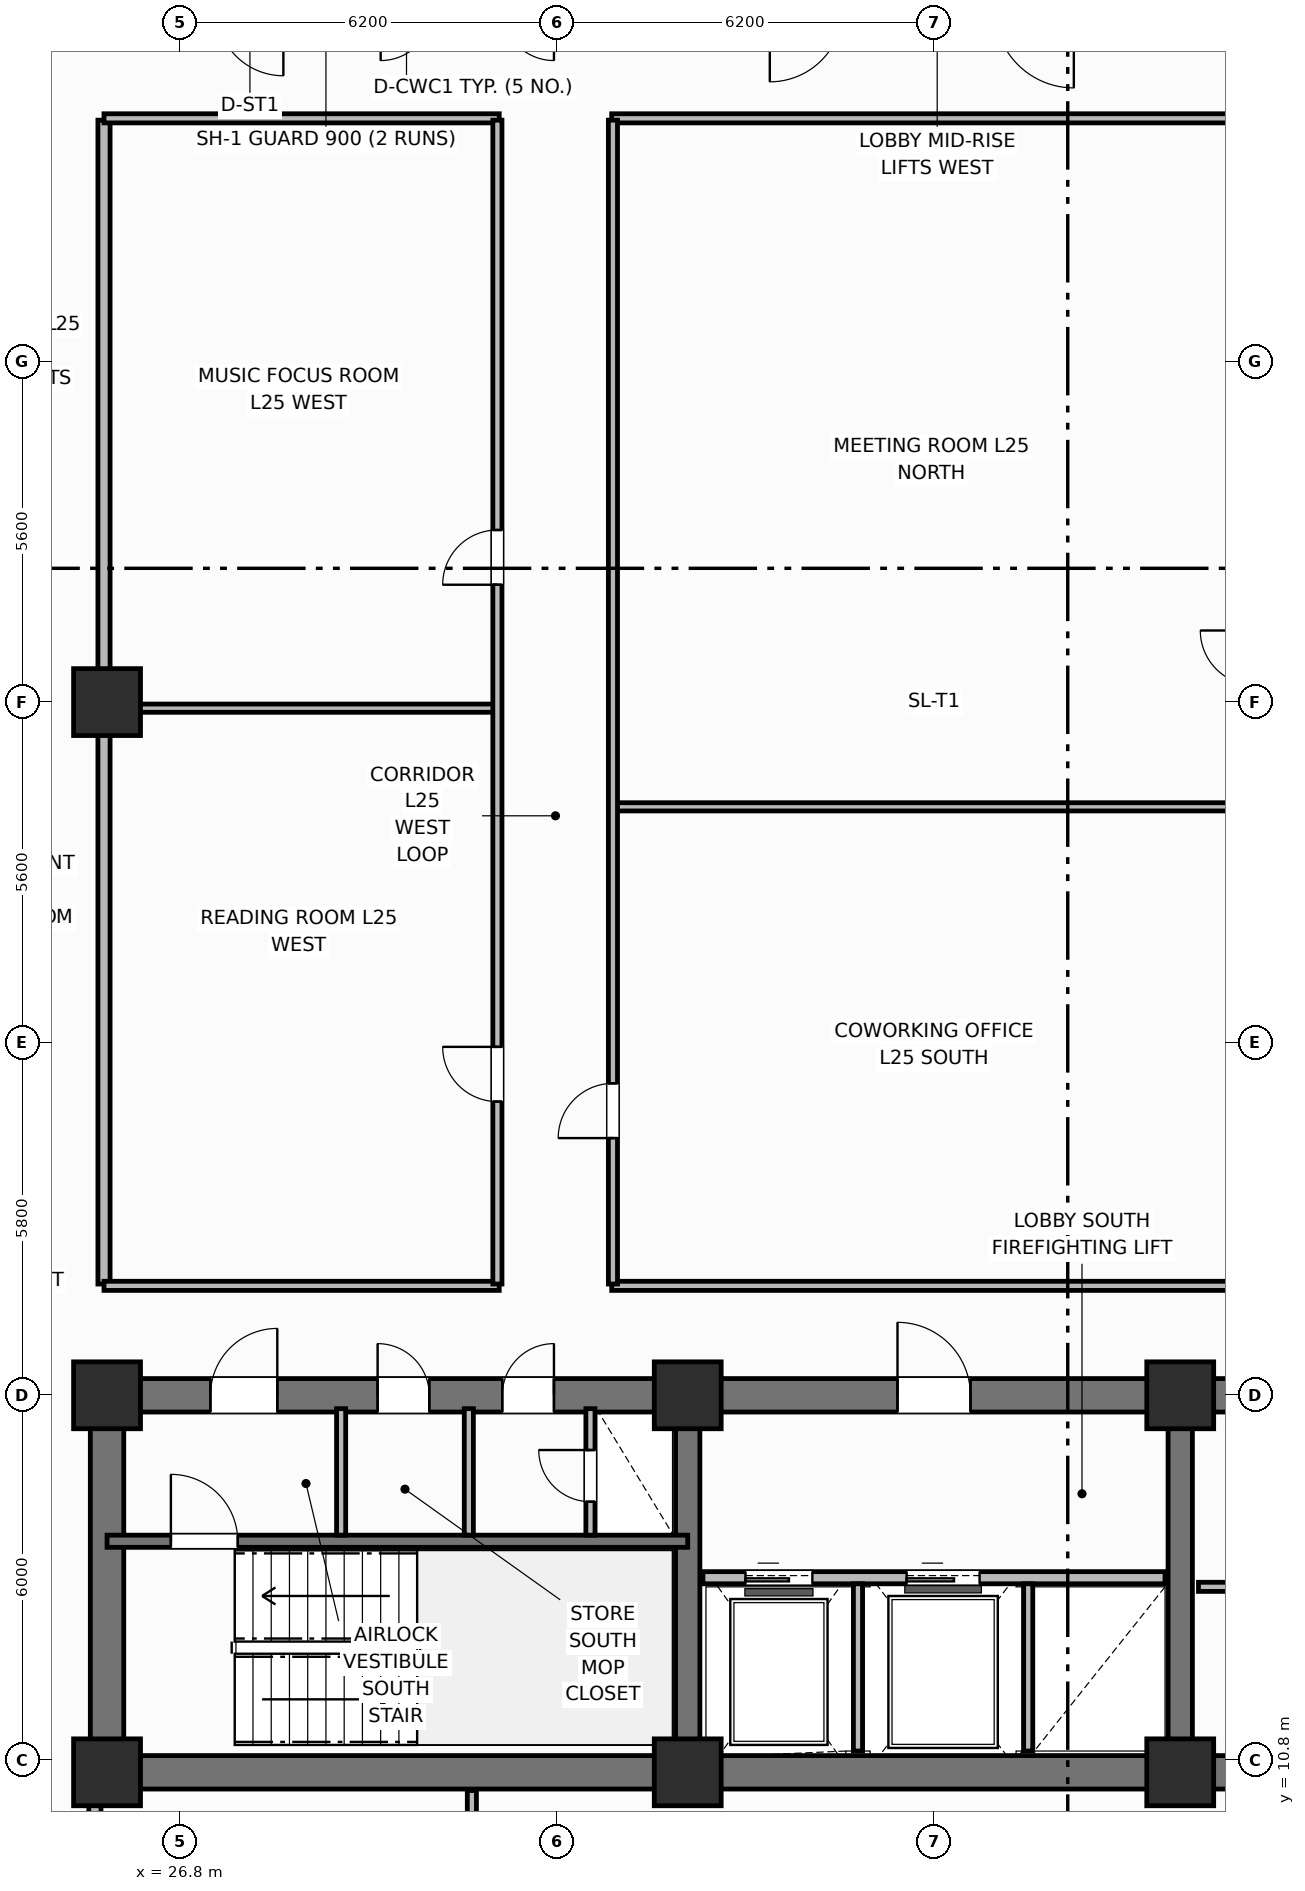
"""IFC4 building model, lengths in metres.
Left out: names, types, materials, properties, quantities, classifications, styles, units other than length and angle.
Written with IfcOpenShell. Run it as: python <this file> out.ifc"""

import sys

from ifc_helpers import new_model, si_unit, direction, frame, frame_2d, origin, origin_2d, place, context, subcontext, project, spatial, rectangle, extrude, element, fill, save


model = new_model("IFC4")
c1 = context("Model", 3, precision=1e-05, world=origin(), true_north=direction((0.0, 1.0)))
c2 = subcontext(c1, "Body", "Model", "MODEL_VIEW")
j1 = project(units=[si_unit("LENGTHUNIT", "METRE"), si_unit("PLANEANGLEUNIT", "RADIAN")], contexts=[c1])
p1 = place(None, origin())
s1 = spatial("IfcSite", under=j1, at=p1, CompositionType="ELEMENT")
p2 = place(p1, origin())
s2 = spatial("IfcBuilding", under=s1, at=p2, CompositionType="ELEMENT")
p3 = place(p2, frame((0.0, 0.0, 103.1)))
s3 = spatial("IfcBuildingStorey", under=s2, at=p3, CompositionType="ELEMENT", Elevation=103.1)
p4 = place(p3, frame((52.8, 10.6, 0.0), z_axis=(0.0, 0.0, 1.0), x_axis=(-1.0, 0.0, 0.0)))
e1 = element("IfcWall", 1, at=p4, inside=s3, PredefinedType="SHEAR", context=c2, shape_type="SweptSolid", body=[
    extrude(rectangle(XDim=27.2, YDim=0.55, at=frame_2d((13.6, 0.0))), origin(), (0.0, 0.0, 1.0), 3.7),
])
p5 = place(p3, frame((25.6, 10.875, 0.0), z_axis=(0.0, 0.0, 1.0), x_axis=(0.0, 1.0, 0.0)))
e2 = element("IfcWall", 2, at=p5, inside=s3, PredefinedType="SHEAR", context=c2, shape_type="SweptSolid", body=[
    extrude(rectangle(XDim=5.65, YDim=0.55, at=frame_2d((2.825, 0.0))), origin(), (0.0, 0.0, 1.0), 3.7),
])
p6 = place(p3, frame((25.6, 16.8, 0.0), z_axis=(0.0, 0.0, 1.0), x_axis=(1.0, 0.0, 0.0)))
e3 = element("IfcWall", 3, at=p6, inside=s3, PredefinedType="SHEAR", context=c2, shape_type="SweptSolid", body=[
    extrude(rectangle(XDim=27.2, YDim=0.55, at=frame_2d((13.6, 0.0))), origin(), (0.0, 0.0, 1.0), 3.7),
])
p7 = place(p6, frame((1.7, 0.0, 0.0)))
e4 = element("IfcOpeningElement", 4, at=p7, cuts=e3, PredefinedType="OPENING", context=c2, shape_type="SweptSolid", body=[
    extrude(rectangle(XDim=1.1, YDim=2.15, at=frame_2d((0.55, 1.075))), frame((0.0, 0.285, 0.0), z_axis=(0.0, -1.0, 0.0), x_axis=(1.0, 0.0, 0.0)), (0.0, 0.0, 1.0), 0.57),
])
p8 = place(p6, frame((4.45, 0.0, 0.0)))
e5 = element("IfcOpeningElement", 5, at=p8, cuts=e3, PredefinedType="OPENING", context=c2, shape_type="SweptSolid", body=[
    extrude(rectangle(XDim=0.85, YDim=2.1, at=frame_2d((0.425, 1.05))), frame((0.0, 0.285, 0.0), z_axis=(0.0, -1.0, 0.0), x_axis=(1.0, 0.0, 0.0)), (0.0, 0.0, 1.0), 0.57),
])
p9 = place(p6, frame((6.5, 0.0, 0.0)))
e6 = element("IfcOpeningElement", 6, at=p9, cuts=e3, PredefinedType="OPENING", context=c2, shape_type="SweptSolid", body=[
    extrude(rectangle(XDim=0.85, YDim=2.1, at=frame_2d((0.425, 1.05))), frame((0.0, 0.285, 0.0), z_axis=(0.0, -1.0, 0.0), x_axis=(1.0, 0.0, 0.0)), (0.0, 0.0, 1.0), 0.57),
])
p10 = place(p6, frame((13.0, 0.0, 0.0)))
e7 = element("IfcOpeningElement", 7, at=p10, cuts=e3, PredefinedType="OPENING", context=c2, shape_type="SweptSolid", body=[
    extrude(rectangle(XDim=1.2, YDim=2.15, at=frame_2d((0.6, 1.075))), frame((0.0, 0.285, 0.0), z_axis=(0.0, -1.0, 0.0), x_axis=(1.0, 0.0, 0.0)), (0.0, 0.0, 1.0), 0.57),
])
p11 = place(p6, frame((19.8, 0.0, 0.0)))
e8 = element("IfcOpeningElement", 8, at=p11, cuts=e3, PredefinedType="OPENING", context=c2, shape_type="SweptSolid", body=[
    extrude(rectangle(XDim=0.85, YDim=2.1, at=frame_2d((0.425, 1.05))), frame((0.0, 0.285, 0.0), z_axis=(0.0, -1.0, 0.0), x_axis=(1.0, 0.0, 0.0)), (0.0, 0.0, 1.0), 0.57),
])
p12 = place(p6, frame((24.2, 0.0, 0.0)))
e9 = element("IfcOpeningElement", 9, at=p12, cuts=e3, PredefinedType="OPENING", context=c2, shape_type="SweptSolid", body=[
    extrude(rectangle(XDim=0.85, YDim=2.1, at=frame_2d((0.425, 1.05))), frame((0.0, 0.285, 0.0), z_axis=(0.0, -1.0, 0.0), x_axis=(1.0, 0.0, 0.0)), (0.0, 0.0, 1.0), 0.57),
])
for number, where, z_axis, x_axis in (
    (10, (35.15, 10.875, 0.0), (0.0, 0.0, 1.0), (0.0, 1.0, 0.0)),
    (11, (43.25, 10.875, 0.0), (0.0, 0.0, 1.0), (0.0, 1.0, 0.0)),
):
    element("IfcWall", number, at=place(p3, frame(where, z_axis=z_axis, x_axis=x_axis)), inside=s3, PredefinedType="SHEAR", context=c2, shape_type="SweptSolid", body=[
        extrude(rectangle(XDim=5.65, YDim=0.4, at=frame_2d((2.825, 0.0))), origin(), (0.0, 0.0, 1.0), 3.7),
    ])
for number, where, z_axis, x_axis in (
    (12, (25.6, 10.6, 0.0), (0.0, 0.0, 1.0), (1.0, 0.0, 0.0)),
    (13, (25.6, 16.8, 0.0), (0.0, 0.0, 1.0), (1.0, 0.0, 0.0)),
    (14, (35.15, 10.6, 0.0), (0.0, 0.0, 1.0), (1.0, 0.0, 0.0)),
    (15, (35.15, 16.8, 0.0), (0.0, 0.0, 1.0), (1.0, 0.0, 0.0)),
    (16, (43.25, 10.6, 0.0), (0.0, 0.0, 1.0), (1.0, 0.0, 0.0)),
    (17, (43.25, 16.8, 0.0), (0.0, 0.0, 1.0), (1.0, 0.0, 0.0)),
    (18, (25.6, 28.2, 0.0), (0.0, 0.0, 1.0), (1.0, 0.0, 0.0)),
):
    element("IfcColumn", number, at=place(p3, frame(where, z_axis=z_axis, x_axis=x_axis)), inside=s3, PredefinedType="COLUMN", context=c2, shape_type="SweptSolid", body=[
        extrude(rectangle(XDim=1.1, YDim=1.1, at=origin_2d()), origin(), (0.0, 0.0, 1.0), 3.7),
    ])
p13 = place(p3, frame((25.6, 14.4, 0.0), z_axis=(0.0, 0.0, 1.0), x_axis=(1.0, 0.0, 0.0)))
e19 = element("IfcWall", 19, at=p13, inside=s3, PredefinedType="SHEAR", context=c2, shape_type="SweptSolid", body=[
    extrude(rectangle(XDim=9.55, YDim=0.2, at=frame_2d((4.775, 0.0))), origin(), (0.0, 0.0, 1.0), 3.7),
])
p14 = place(p13, frame((1.05, 0.0, 0.0)))
e20 = element("IfcOpeningElement", 20, at=p14, cuts=e19, PredefinedType="OPENING", context=c2, shape_type="SweptSolid", body=[
    extrude(rectangle(XDim=1.1, YDim=2.15, at=frame_2d((0.55, 1.075))), frame((0.0, 0.11, 0.0), z_axis=(0.0, -1.0, 0.0), x_axis=(1.0, 0.0, 0.0)), (0.0, 0.0, 1.0), 0.22),
])
for number, where, z_axis, x_axis in (
    (21, (29.45, 14.5, 0.0), (0.0, 0.0, 1.0), (0.0, 1.0, 0.0)),
    (22, (31.55, 14.5, 0.0), (0.0, 0.0, 1.0), (0.0, 1.0, 0.0)),
):
    element("IfcWall", number, at=place(p3, frame(where, z_axis=z_axis, x_axis=x_axis)), inside=s3, PredefinedType="PARTITIONING", context=c2, shape_type="SweptSolid", body=[
        extrude(rectangle(XDim=2.08, YDim=0.15, at=frame_2d((1.04, 0.0))), origin(), (0.0, 0.0, 1.0), 2.53),
    ])
p15 = place(p3, frame((33.55, 14.5, 0.0), z_axis=(0.0, 0.0, 1.0), x_axis=(0.0, 1.0, 0.0)))
e23 = element("IfcWall", 23, at=p15, inside=s3, PredefinedType="PARTITIONING", context=c2, shape_type="SweptSolid", body=[
    extrude(rectangle(XDim=2.08, YDim=0.15, at=frame_2d((1.04, 0.0))), origin(), (0.0, 0.0, 1.0), 2.53),
])
p16 = place(p15, frame((0.55, 0.0, 0.0)))
e24 = element("IfcOpeningElement", 24, at=p16, cuts=e23, PredefinedType="OPENING", context=c2, shape_type="SweptSolid", body=[
    extrude(rectangle(XDim=0.85, YDim=2.05, at=frame_2d((0.425, 1.025))), frame((0.0, 0.085, 0.0), z_axis=(0.0, -1.0, 0.0), x_axis=(1.0, 0.0, 0.0)), (0.0, 0.0, 1.0), 0.17),
])
p17 = place(p3, frame((35.4, 13.8, 0.0), z_axis=(0.0, 0.0, 1.0), x_axis=(1.0, 0.0, 0.0)))
e25 = element("IfcWall", 25, at=p17, inside=s3, PredefinedType="PARTITIONING", context=c2, shape_type="SweptSolid", body=[
    extrude(rectangle(XDim=7.6, YDim=0.2, at=frame_2d((3.8, 0.0))), origin(), (0.0, 0.0, 1.0), 2.3),
])
p18 = place(p17, frame((0.7, 0.0, 0.0)))
e26 = element("IfcOpeningElement", 26, at=p18, cuts=e25, PredefinedType="OPENING", context=c2, shape_type="SweptSolid", body=[
    extrude(rectangle(XDim=1.1, YDim=2.15, at=frame_2d((0.55, 1.075))), frame((0.0, 0.11, 0.0), z_axis=(0.0, -1.0, 0.0), x_axis=(1.0, 0.0, 0.0)), (0.0, 0.0, 1.0), 0.22),
])
p19 = place(p17, frame((3.35, 0.0, 0.0)))
e27 = element("IfcOpeningElement", 27, at=p19, cuts=e25, PredefinedType="OPENING", context=c2, shape_type="SweptSolid", body=[
    extrude(rectangle(XDim=1.2, YDim=2.15, at=frame_2d((0.6, 1.075))), frame((0.0, 0.11, 0.0), z_axis=(0.0, -1.0, 0.0), x_axis=(1.0, 0.0, 0.0)), (0.0, 0.0, 1.0), 0.22),
])
for number, where, z_axis, x_axis in (
    (28, (37.95, 10.95, 0.0), (0.0, 0.0, 1.0), (0.0, 1.0, 0.0)),
    (29, (40.75, 10.95, 0.0), (0.0, 0.0, 1.0), (0.0, 1.0, 0.0)),
):
    element("IfcWall", number, at=place(p3, frame(where, z_axis=z_axis, x_axis=x_axis)), inside=s3, PredefinedType="PARTITIONING", context=c2, shape_type="SweptSolid", body=[
        extrude(rectangle(XDim=2.75, YDim=0.15, at=frame_2d((1.375, 0.0))), origin(), (0.0, 0.0, 1.0), 2.53),
    ])
p20 = place(p3, frame((43.55, 13.65, 0.0), z_axis=(0.0, 0.0, 1.0), x_axis=(1.0, 0.0, 0.0)))
e30 = element("IfcWall", 30, at=p20, inside=s3, PredefinedType="PARTITIONING", context=c2, shape_type="SweptSolid", body=[
    extrude(rectangle(XDim=4.4, YDim=0.15, at=frame_2d((2.2, 0.0))), origin(), (0.0, 0.0, 1.0), 2.53),
])
p21 = place(p20, frame((1.6, 0.0, 0.0)))
e31 = element("IfcOpeningElement", 31, at=p21, cuts=e30, PredefinedType="OPENING", context=c2, shape_type="SweptSolid", body=[
    extrude(rectangle(XDim=0.85, YDim=2.1, at=frame_2d((0.425, 1.05))), frame((0.0, 0.085, 0.0), z_axis=(0.0, -1.0, 0.0), x_axis=(1.0, 0.0, 0.0)), (0.0, 0.0, 1.0), 0.17),
])
p22 = place(p3, frame((25.55, 18.63, 0.0), z_axis=(0.0, 0.0, 1.0), x_axis=(0.0, 1.0, 0.0)))
e32 = element("IfcWall", 32, at=p22, inside=s3, PredefinedType="PARTITIONING", context=c2, shape_type="SweptSolid", body=[
    extrude(rectangle(XDim=19.14, YDim=0.2, at=frame_2d((9.57, 0.0))), origin(), (0.0, 0.0, 1.0), 2.53),
])
for number, where, z_axis, x_axis in (
    (33, (25.55, 18.6, 0.0), (0.0, 0.0, 1.0), (1.0, 0.0, 0.0)),
    (34, (25.55, 37.8, 0.0), (0.0, 0.0, 1.0), (1.0, 0.0, 0.0)),
):
    element("IfcWall", number, at=place(p3, frame(where, z_axis=z_axis, x_axis=x_axis)), inside=s3, PredefinedType="PARTITIONING", context=c2, shape_type="SweptSolid", body=[
        extrude(rectangle(XDim=6.5, YDim=0.15, at=frame_2d((3.25, 0.0))), origin(), (0.0, 0.0, 1.0), 2.53),
    ])
for number, where, z_axis, x_axis in (
    (35, (33.9, 18.6, 0.0), (0.0, 0.0, 1.0), (1.0, 0.0, 0.0)),
    (36, (33.9, 37.8, 0.0), (0.0, 0.0, 1.0), (1.0, 0.0, 0.0)),
):
    element("IfcWall", number, at=place(p3, frame(where, z_axis=z_axis, x_axis=x_axis)), inside=s3, PredefinedType="PARTITIONING", context=c2, shape_type="SweptSolid", body=[
        extrude(rectangle(XDim=10.6, YDim=0.15, at=frame_2d((5.3, 0.0))), origin(), (0.0, 0.0, 1.0), 2.53),
    ])
p23 = place(p3, frame((25.6, 28.1, 0.0), z_axis=(0.0, 0.0, 1.0), x_axis=(1.0, 0.0, 0.0)))
e37 = element("IfcWall", 37, at=p23, inside=s3, PredefinedType="PARTITIONING", context=c2, shape_type="SweptSolid", body=[
    extrude(rectangle(XDim=6.42, YDim=0.135, at=frame_2d((3.21, 0.0))), origin(), (0.0, 0.0, 1.0), 2.53),
])
p24 = place(p3, frame((33.92, 26.477, 0.0), z_axis=(0.0, 0.0, 1.0), x_axis=(1.0, 0.0, 0.0)))
e38 = element("IfcWall", 38, at=p24, inside=s3, PredefinedType="PARTITIONING", context=c2, shape_type="SweptSolid", body=[
    extrude(rectangle(XDim=10.56, YDim=0.135, at=frame_2d((5.28, 0.0))), origin(), (0.0, 0.0, 1.0), 2.53),
])
p25 = place(p3, frame((32.02, 18.63, 0.0), z_axis=(0.0, 0.0, 1.0), x_axis=(0.0, 1.0, 0.0)))
e39 = element("IfcWall", 39, at=p25, inside=s3, PredefinedType="PARTITIONING", context=c2, shape_type="SweptSolid", body=[
    extrude(rectangle(XDim=19.14, YDim=0.15, at=frame_2d((9.57, 0.0))), origin(), (0.0, 0.0, 1.0), 2.53),
])
p26 = place(p25, frame((3.0, 0.0, 0.0)))
e40 = element("IfcOpeningElement", 40, at=p26, cuts=e39, PredefinedType="OPENING", context=c2, shape_type="SweptSolid", body=[
    extrude(rectangle(XDim=0.9, YDim=2.1, at=frame_2d((0.45, 1.05))), frame((0.0, 0.085, 0.0), z_axis=(0.0, -1.0, 0.0), x_axis=(1.0, 0.0, 0.0)), (0.0, 0.0, 1.0), 0.17),
])
p27 = place(p25, frame((11.5, 0.0, 0.0)))
e41 = element("IfcOpeningElement", 41, at=p27, cuts=e39, PredefinedType="OPENING", context=c2, shape_type="SweptSolid", body=[
    extrude(rectangle(XDim=0.9, YDim=2.1, at=frame_2d((0.45, 1.05))), frame((0.0, 0.085, 0.0), z_axis=(0.0, -1.0, 0.0), x_axis=(1.0, 0.0, 0.0)), (0.0, 0.0, 1.0), 0.17),
])
p28 = place(p3, frame((33.92, 18.63, 0.0), z_axis=(0.0, 0.0, 1.0), x_axis=(0.0, 1.0, 0.0)))
e42 = element("IfcWall", 42, at=p28, inside=s3, PredefinedType="PARTITIONING", context=c2, shape_type="SweptSolid", body=[
    extrude(rectangle(XDim=19.14, YDim=0.15, at=frame_2d((9.57, 0.0))), origin(), (0.0, 0.0, 1.0), 2.53),
])
p29 = place(p28, frame((2.4, 0.0, 0.0)))
e43 = element("IfcOpeningElement", 43, at=p29, cuts=e42, PredefinedType="OPENING", context=c2, shape_type="SweptSolid", body=[
    extrude(rectangle(XDim=0.9, YDim=2.1, at=frame_2d((0.45, 1.05))), frame((0.0, 0.085, 0.0), z_axis=(0.0, -1.0, 0.0), x_axis=(1.0, 0.0, 0.0)), (0.0, 0.0, 1.0), 0.17),
])
p30 = place(p3, frame((31.6, 4.97, 0.0), z_axis=(0.0, 0.0, 1.0), x_axis=(0.0, 1.0, 0.0)))
e44 = element("IfcWall", 44, at=p30, inside=s3, PredefinedType="PARTITIONING", context=c2, shape_type="SweptSolid", body=[
    extrude(rectangle(XDim=5.33, YDim=0.15, at=frame_2d((2.665, 0.0))), origin(), (0.0, 0.0, 1.0), 2.53),
])
p31 = place(p30, frame((1.65, 0.0, 0.0)))
e45 = element("IfcOpeningElement", 45, at=p31, cuts=e44, PredefinedType="OPENING", context=c2, shape_type="SweptSolid", body=[
    extrude(rectangle(XDim=0.9, YDim=2.1, at=frame_2d((0.45, 1.05))), frame((0.0, 0.085, 0.0), z_axis=(0.0, -1.0, 0.0), x_axis=(1.0, 0.0, 0.0)), (0.0, 0.0, 1.0), 0.17),
])
p32 = place(p3, frame((25.4, 5.97, 0.0), z_axis=(0.0, 0.0, 1.0), x_axis=(0.0, 1.0, 0.0)))
e46 = element("IfcWall", 46, at=p32, inside=s3, PredefinedType="PARTITIONING", context=c2, shape_type="SweptSolid", body=[
    extrude(rectangle(XDim=4.33, YDim=0.2, at=frame_2d((2.165, 0.0))), origin(), (0.0, 0.0, 1.0), 2.53),
])
p33 = place(p32, frame((0.85, 0.0, 0.0)))
e47 = element("IfcOpeningElement", 47, at=p33, cuts=e46, PredefinedType="OPENING", context=c2, shape_type="SweptSolid", body=[
    extrude(rectangle(XDim=0.9, YDim=2.1, at=frame_2d((0.45, 1.05))), frame((0.0, 0.11, 0.0), z_axis=(0.0, -1.0, 0.0), x_axis=(1.0, 0.0, 0.0)), (0.0, 0.0, 1.0), 0.22),
])
p34 = place(p14, origin())
e48 = element("IfcDoor", 48, at=p34, inside=s3, OperationType="SINGLE_SWING_LEFT", PredefinedType="DOOR", context=c2, shape_type="SweptSolid", body=[
    extrude(rectangle(XDim=1.1, YDim=2.15, at=frame_2d((0.55, 1.075))), frame((0.0, 0.025, 0.0), z_axis=(0.0, -1.0, 0.0), x_axis=(1.0, 0.0, 0.0)), (0.0, 0.0, 1.0), 0.05),
])
fill(e20, e48)
p35 = place(p16, origin())
e49 = element("IfcDoor", 49, at=p35, inside=s3, OperationType="SINGLE_SWING_RIGHT", PredefinedType="TRAPDOOR", context=c2, shape_type="SweptSolid", body=[
    extrude(rectangle(XDim=0.85, YDim=2.05, at=frame_2d((0.425, 1.025))), frame((0.0, 0.025, 0.0), z_axis=(0.0, -1.0, 0.0), x_axis=(1.0, 0.0, 0.0)), (0.0, 0.0, 1.0), 0.05),
])
fill(e24, e49)
p36 = place(p18, origin())
e50 = element("IfcDoor", 50, at=p36, inside=s3, OperationType="SLIDING_TO_LEFT", PredefinedType="DOOR", context=c2, shape_type="SweptSolid", body=[
    extrude(rectangle(XDim=1.1, YDim=2.15, at=frame_2d((0.55, 1.075))), frame((0.0, 0.025, 0.0), z_axis=(0.0, -1.0, 0.0), x_axis=(1.0, 0.0, 0.0)), (0.0, 0.0, 1.0), 0.05),
])
fill(e26, e50)
p37 = place(p19, origin())
e51 = element("IfcDoor", 51, at=p37, inside=s3, OperationType="SLIDING_TO_LEFT", PredefinedType="DOOR", context=c2, shape_type="SweptSolid", body=[
    extrude(rectangle(XDim=1.2, YDim=2.15, at=frame_2d((0.6, 1.075))), frame((0.0, 0.025, 0.0), z_axis=(0.0, -1.0, 0.0), x_axis=(1.0, 0.0, 0.0)), (0.0, 0.0, 1.0), 0.05),
])
fill(e27, e51)
p38 = place(p26, origin())
e52 = element("IfcDoor", 52, at=p38, inside=s3, OperationType="SINGLE_SWING_RIGHT", PredefinedType="DOOR", context=c2, shape_type="SweptSolid", body=[
    extrude(rectangle(XDim=0.9, YDim=2.1, at=frame_2d((0.45, 1.05))), frame((0.0, 0.025, 0.0), z_axis=(0.0, -1.0, 0.0), x_axis=(1.0, 0.0, 0.0)), (0.0, 0.0, 1.0), 0.05),
])
fill(e40, e52)
p39 = place(p27, origin())
e53 = element("IfcDoor", 53, at=p39, inside=s3, OperationType="SINGLE_SWING_LEFT", PredefinedType="DOOR", context=c2, shape_type="SweptSolid", body=[
    extrude(rectangle(XDim=0.9, YDim=2.1, at=frame_2d((0.45, 1.05))), frame((0.0, 0.025, 0.0), z_axis=(0.0, -1.0, 0.0), x_axis=(1.0, 0.0, 0.0)), (0.0, 0.0, 1.0), 0.05),
])
fill(e41, e53)
p40 = place(p29, origin())
e54 = element("IfcDoor", 54, at=p40, inside=s3, OperationType="SINGLE_SWING_LEFT", PredefinedType="DOOR", context=c2, shape_type="SweptSolid", body=[
    extrude(rectangle(XDim=0.9, YDim=2.1, at=frame_2d((0.45, 1.05))), frame((0.0, 0.025, 0.0), z_axis=(0.0, -1.0, 0.0), x_axis=(1.0, 0.0, 0.0)), (0.0, 0.0, 1.0), 0.05),
])
fill(e43, e54)
p41 = place(p7, origin())
e55 = element("IfcDoor", 55, at=p41, inside=s3, OperationType="SINGLE_SWING_RIGHT", PredefinedType="DOOR", context=c2, shape_type="SweptSolid", body=[
    extrude(rectangle(XDim=1.1, YDim=2.15, at=frame_2d((0.55, 1.075))), frame((0.0, 0.025, 0.0), z_axis=(0.0, -1.0, 0.0), x_axis=(1.0, 0.0, 0.0)), (0.0, 0.0, 1.0), 0.05),
])
fill(e4, e55)
p42 = place(p8, origin())
e56 = element("IfcDoor", 56, at=p42, inside=s3, OperationType="SINGLE_SWING_LEFT", PredefinedType="DOOR", context=c2, shape_type="SweptSolid", body=[
    extrude(rectangle(XDim=0.85, YDim=2.1, at=frame_2d((0.425, 1.05))), frame((0.0, 0.025, 0.0), z_axis=(0.0, -1.0, 0.0), x_axis=(1.0, 0.0, 0.0)), (0.0, 0.0, 1.0), 0.05),
])
fill(e5, e56)
p43 = place(p9, origin())
e57 = element("IfcDoor", 57, at=p43, inside=s3, OperationType="SINGLE_SWING_RIGHT", PredefinedType="DOOR", context=c2, shape_type="SweptSolid", body=[
    extrude(rectangle(XDim=0.85, YDim=2.1, at=frame_2d((0.425, 1.05))), frame((0.0, 0.025, 0.0), z_axis=(0.0, -1.0, 0.0), x_axis=(1.0, 0.0, 0.0)), (0.0, 0.0, 1.0), 0.05),
])
fill(e6, e57)
p44 = place(p10, origin())
e58 = element("IfcDoor", 58, at=p44, inside=s3, OperationType="SINGLE_SWING_LEFT", PredefinedType="DOOR", context=c2, shape_type="SweptSolid", body=[
    extrude(rectangle(XDim=1.2, YDim=2.15, at=frame_2d((0.6, 1.075))), frame((0.0, 0.025, 0.0), z_axis=(0.0, -1.0, 0.0), x_axis=(1.0, 0.0, 0.0)), (0.0, 0.0, 1.0), 0.05),
])
fill(e7, e58)
save(model, sys.argv[1])
